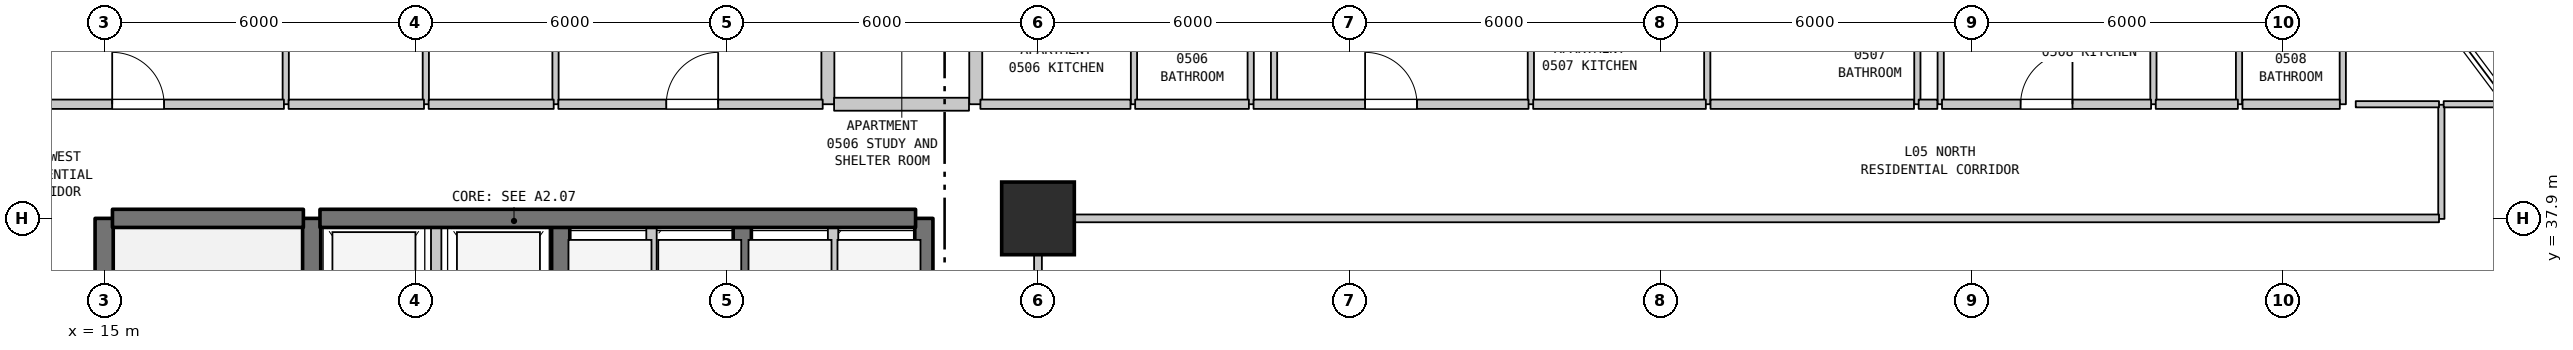
"""IFC4 building model, lengths in metres.
Left out: names, types, materials, properties, quantities, classifications, styles, units other than length and angle.
Written with IfcOpenShell. Run it as: python <this file> out.ifc"""

import sys

from ifc_helpers import new_model, si_unit, direction, frame, frame_2d, origin, origin_2d, place, context, subcontext, project, spatial, rectangle, extrude, element, fill, save


model = new_model("IFC4")
c1 = context("Model", 3, precision=1e-05, world=origin(), true_north=direction((0.0, 1.0)))
c2 = subcontext(c1, "Body", "Model", "MODEL_VIEW")
j1 = project(units=[si_unit("LENGTHUNIT", "METRE"), si_unit("PLANEANGLEUNIT", "RADIAN")], contexts=[c1])
p1 = place(None, origin())
s1 = spatial("IfcSite", under=j1, at=p1, CompositionType="ELEMENT")
p2 = place(p1, origin())
s2 = spatial("IfcBuilding", under=s1, at=p2, CompositionType="ELEMENT")
p3 = place(p2, frame((0.0, 0.0, 27.7)))
s3 = spatial("IfcBuildingStorey", under=s2, at=p3, CompositionType="ELEMENT", Elevation=27.7)
p4 = place(p3, frame((33.0, 37.9, 0.0), z_axis=(0.0, 0.0, 1.0), x_axis=(1.0, 0.0, 0.0)))
e1 = element("IfcColumn", 1, at=p4, inside=s3, PredefinedType="COLUMN", context=c2, shape_type="SweptSolid", body=[
    extrude(rectangle(XDim=1.4, YDim=1.4, at=origin_2d()), origin(), (0.0, 0.0, 1.0), 3.7),
])
p5 = place(p3, frame((15.0, 31.1, 0.0), z_axis=(0.0, 0.0, 1.0), x_axis=(0.0, 1.0, 0.0)))
e2 = element("IfcWall", 2, at=p5, inside=s3, PredefinedType="SHEAR", context=c2, shape_type="SweptSolid", body=[
    extrude(rectangle(XDim=6.8, YDim=0.35, at=frame_2d((3.4, 0.0))), origin(), (0.0, 0.0, 1.0), 3.385),
])
p6 = place(p3, frame((18.5, 40.1, 0.0), z_axis=(0.0, 0.0, 1.0), x_axis=(0.0, 1.0, 0.0)))
e3 = element("IfcWall", 3, at=p6, inside=s3, PredefinedType="PARTITIONING", context=c2, shape_type="SweptSolid", body=[
    extrude(rectangle(XDim=3.2, YDim=0.12, at=frame_2d((1.6, 0.0))), origin(), (0.0, 0.0, 1.0), 3.385),
])
p7 = place(p3, frame((19.0, 35.0, 0.0), z_axis=(0.0, 0.0, 1.0), x_axis=(0.0, 1.0, 0.0)))
e4 = element("IfcWall", 4, at=p7, inside=s3, PredefinedType="SHEAR", context=c2, shape_type="SweptSolid", body=[
    extrude(rectangle(XDim=2.9, YDim=0.35, at=frame_2d((1.45, 0.0))), origin(), (0.0, 0.0, 1.0), 3.385),
])
p8 = place(p3, frame((21.2, 40.1, 0.0), z_axis=(0.0, 0.0, 1.0), x_axis=(0.0, 1.0, 0.0)))
e5 = element("IfcWall", 5, at=p8, inside=s3, PredefinedType="PARTITIONING", context=c2, shape_type="SweptSolid", body=[
    extrude(rectangle(XDim=3.2, YDim=0.12, at=frame_2d((1.6, 0.0))), origin(), (0.0, 0.0, 1.0), 3.385),
])
p9 = place(p8, frame((1.15, 0.0, 0.0)))
e6 = element("IfcOpeningElement", 6, at=p9, cuts=e5, PredefinedType="OPENING", context=c2, shape_type="SweptSolid", body=[
    extrude(rectangle(XDim=0.9, YDim=2.15, at=frame_2d((0.45, 1.075))), frame((0.0, 0.07, 0.0), z_axis=(0.0, -1.0, 0.0), x_axis=(1.0, 0.0, 0.0)), (0.0, 0.0, 1.0), 0.14),
])
p10 = place(p3, frame((21.4, 35.0, 0.0), z_axis=(0.0, 0.0, 1.0), x_axis=(0.0, 1.0, 0.0)))
e7 = element("IfcWall", 7, at=p10, inside=s3, PredefinedType="STANDARD", context=c2, shape_type="SweptSolid", body=[
    extrude(rectangle(XDim=2.9, YDim=0.2, at=frame_2d((1.45, 0.0))), origin(), (0.0, 0.0, 1.0), 3.385),
])
p11 = place(p3, frame((23.7, 40.1, 0.0), z_axis=(0.0, 0.0, 1.0), x_axis=(0.0, 1.0, 0.0)))
e8 = element("IfcWall", 8, at=p11, inside=s3, PredefinedType="PARTITIONING", context=c2, shape_type="SweptSolid", body=[
    extrude(rectangle(XDim=2.05, YDim=0.12, at=frame_2d((1.025, 0.0))), origin(), (0.0, 0.0, 1.0), 3.385),
])
p12 = place(p3, frame((23.8, 35.0, 0.0), z_axis=(0.0, 0.0, 1.0), x_axis=(0.0, 1.0, 0.0)))
e9 = element("IfcWall", 9, at=p12, inside=s3, PredefinedType="SHEAR", context=c2, shape_type="SweptSolid", body=[
    extrude(rectangle(XDim=2.9, YDim=0.35, at=frame_2d((1.45, 0.0))), origin(), (0.0, 0.0, 1.0), 3.385),
])
p13 = place(p3, frame((25.55, 35.0, 0.0), z_axis=(0.0, 0.0, 1.0), x_axis=(0.0, 1.0, 0.0)))
e10 = element("IfcWall", 10, at=p13, inside=s3, PredefinedType="STANDARD", context=c2, shape_type="SweptSolid", body=[
    extrude(rectangle(XDim=2.9, YDim=0.2, at=frame_2d((1.45, 0.0))), origin(), (0.0, 0.0, 1.0), 3.385),
])
p14 = place(p3, frame((27.3, 35.0, 0.0), z_axis=(0.0, 0.0, 1.0), x_axis=(0.0, 1.0, 0.0)))
e11 = element("IfcWall", 11, at=p14, inside=s3, PredefinedType="SHEAR", context=c2, shape_type="SweptSolid", body=[
    extrude(rectangle(XDim=2.9, YDim=0.35, at=frame_2d((1.45, 0.0))), origin(), (0.0, 0.0, 1.0), 3.385),
])
p15 = place(p3, frame((28.95, 40.1, 0.0), z_axis=(0.0, 0.0, 1.0), x_axis=(0.0, 1.0, 0.0)))
e12 = element("IfcWall", 12, at=p15, inside=s3, PredefinedType="STANDARD", context=c2, shape_type="SweptSolid", body=[
    extrude(rectangle(XDim=2.3, YDim=0.25, at=frame_2d((1.15, 0.0))), origin(), (0.0, 0.0, 1.0), 3.385),
])
p16 = place(p3, frame((29.05, 35.0, 0.0), z_axis=(0.0, 0.0, 1.0), x_axis=(0.0, 1.0, 0.0)))
e13 = element("IfcWall", 13, at=p16, inside=s3, PredefinedType="STANDARD", context=c2, shape_type="SweptSolid", body=[
    extrude(rectangle(XDim=2.9, YDim=0.2, at=frame_2d((1.45, 0.0))), origin(), (0.0, 0.0, 1.0), 3.385),
])
p17 = place(p3, frame((30.8, 35.0, 0.0), z_axis=(0.0, 0.0, 1.0), x_axis=(0.0, 1.0, 0.0)))
e14 = element("IfcWall", 14, at=p17, inside=s3, PredefinedType="SHEAR", context=c2, shape_type="SweptSolid", body=[
    extrude(rectangle(XDim=2.9, YDim=0.35, at=frame_2d((1.45, 0.0))), origin(), (0.0, 0.0, 1.0), 3.385),
])
p18 = place(p3, frame((31.8, 40.1, 0.0), z_axis=(0.0, 0.0, 1.0), x_axis=(0.0, 1.0, 0.0)))
e15 = element("IfcWall", 15, at=p18, inside=s3, PredefinedType="STANDARD", context=c2, shape_type="SweptSolid", body=[
    extrude(rectangle(XDim=2.3, YDim=0.25, at=frame_2d((1.15, 0.0))), origin(), (0.0, 0.0, 1.0), 3.385),
])
p19 = place(p3, frame((33.0, 27.91, 0.0), z_axis=(0.0, 0.0, 1.0), x_axis=(0.0, 1.0, 0.0)))
e16 = element("IfcWall", 16, at=p19, inside=s3, PredefinedType="STANDARD", context=c2, shape_type="SweptSolid", body=[
    extrude(rectangle(XDim=9.98, YDim=0.15, at=frame_2d((4.99, 0.0))), origin(), (0.0, 0.0, 1.0), 2.885),
])
for number, where, z_axis, x_axis in (
    (17, (34.85, 40.1, 0.0), (0.0, 0.0, 1.0), (0.0, 1.0, 0.0)),
    (18, (37.1, 40.1, 0.0), (0.0, 0.0, 1.0), (0.0, 1.0, 0.0)),
):
    element("IfcWall", number, at=place(p3, frame(where, z_axis=z_axis, x_axis=x_axis)), inside=s3, PredefinedType="PARTITIONING", context=c2, shape_type="SweptSolid", body=[
        extrude(rectangle(XDim=2.3, YDim=0.12, at=frame_2d((1.15, 0.0))), origin(), (0.0, 0.0, 1.0), 3.385),
    ])
p20 = place(p3, frame((37.55, 40.1, 0.0), z_axis=(0.0, 0.0, 1.0), x_axis=(0.0, 1.0, 0.0)))
e19 = element("IfcWall", 19, at=p20, inside=s3, PredefinedType="PARTITIONING", context=c2, shape_type="SweptSolid", body=[
    extrude(rectangle(XDim=2.05, YDim=0.12, at=frame_2d((1.025, 0.0))), origin(), (0.0, 0.0, 1.0), 3.385),
])
for number, where, z_axis, x_axis in (
    (20, (42.5, 40.1, 0.0), (0.0, 0.0, 1.0), (0.0, 1.0, 0.0)),
    (21, (45.9, 40.1, 0.0), (0.0, 0.0, 1.0), (0.0, 1.0, 0.0)),
    (22, (49.95, 40.1, 0.0), (0.0, 0.0, 1.0), (0.0, 1.0, 0.0)),
):
    element("IfcWall", number, at=place(p3, frame(where, z_axis=z_axis, x_axis=x_axis)), inside=s3, PredefinedType="PARTITIONING", context=c2, shape_type="SweptSolid", body=[
        extrude(rectangle(XDim=2.3, YDim=0.12, at=frame_2d((1.15, 0.0))), origin(), (0.0, 0.0, 1.0), 3.385),
    ])
p21 = place(p3, frame((50.4, 40.1, 0.0), z_axis=(0.0, 0.0, 1.0), x_axis=(0.0, 1.0, 0.0)))
e23 = element("IfcWall", 23, at=p21, inside=s3, PredefinedType="PARTITIONING", context=c2, shape_type="SweptSolid", body=[
    extrude(rectangle(XDim=5.35, YDim=0.12, at=frame_2d((2.675, 0.0))), origin(), (0.0, 0.0, 1.0), 3.385),
])
for number, where, z_axis, x_axis in (
    (24, (54.5, 40.1, 0.0), (0.0, 0.0, 1.0), (0.0, 1.0, 0.0)),
    (25, (56.15, 40.1, 0.0), (0.0, 0.0, 1.0), (0.0, 1.0, 0.0)),
    (26, (58.15, 40.1, 0.0), (0.0, 0.0, 1.0), (0.0, 1.0, 0.0)),
):
    element("IfcWall", number, at=place(p3, frame(where, z_axis=z_axis, x_axis=x_axis)), inside=s3, PredefinedType="PARTITIONING", context=c2, shape_type="SweptSolid", body=[
        extrude(rectangle(XDim=2.3, YDim=0.12, at=frame_2d((1.15, 0.0))), origin(), (0.0, 0.0, 1.0), 3.385),
    ])
p22 = place(p3, frame((60.05, 37.89, 0.0), z_axis=(0.0, 0.0, 1.0), x_axis=(0.0, 1.0, 0.0)))
e27 = element("IfcWall", 27, at=p22, inside=s3, PredefinedType="PARTITIONING", context=c2, shape_type="SweptSolid", body=[
    extrude(rectangle(XDim=2.2, YDim=0.12, at=frame_2d((1.1, 0.0))), origin(), (0.0, 0.0, 1.0), 3.385),
])
p23 = place(p3, frame((15.16, 37.9, 0.0), z_axis=(0.0, 0.0, 1.0), x_axis=(1.0, 0.0, 0.0)))
e28 = element("IfcWall", 28, at=p23, inside=s3, PredefinedType="SHEAR", context=c2, shape_type="SweptSolid", body=[
    extrude(rectangle(XDim=3.68, YDim=0.35, at=frame_2d((1.84, 0.0))), origin(), (0.0, 0.0, 1.0), 3.385),
])
p24 = place(p3, frame((19.16, 37.9, 0.0), z_axis=(0.0, 0.0, 1.0), x_axis=(1.0, 0.0, 0.0)))
e29 = element("IfcWall", 29, at=p24, inside=s3, PredefinedType="SHEAR", context=c2, shape_type="SweptSolid", body=[
    extrude(rectangle(XDim=11.48, YDim=0.35, at=frame_2d((5.74, 0.0))), origin(), (0.0, 0.0, 1.0), 3.385),
])
p25 = place(p3, frame((33.07, 37.9, 0.0), z_axis=(0.0, 0.0, 1.0), x_axis=(1.0, 0.0, 0.0)))
e30 = element("IfcWall", 30, at=p25, inside=s3, PredefinedType="STANDARD", context=c2, shape_type="SweptSolid", body=[
    extrude(rectangle(XDim=26.935, YDim=0.15, at=frame_2d((13.467, 0.0))), origin(), (0.0, 0.0, 1.0), 3.385),
])
p26 = place(p3, frame((12.875, 40.1, 0.0), z_axis=(0.0, 0.0, 1.0), x_axis=(1.0, 0.0, 0.0)))
e31 = element("IfcWall", 31, at=p26, inside=s3, PredefinedType="STANDARD", context=c2, shape_type="SweptSolid", body=[
    extrude(rectangle(XDim=5.59, YDim=0.18, at=frame_2d((2.795, 0.0))), origin(), (0.0, 0.0, 1.0), 3.385),
])
p27 = place(p26, frame((2.28, 0.0, 0.0)))
e32 = element("IfcOpeningElement", 32, at=p27, cuts=e31, PredefinedType="OPENING", context=c2, shape_type="SweptSolid", body=[
    extrude(rectangle(XDim=1.0, YDim=2.15, at=frame_2d((0.5, 1.075))), frame((0.0, 0.1, 0.0), z_axis=(0.0, -1.0, 0.0), x_axis=(1.0, 0.0, 0.0)), (0.0, 0.0, 1.0), 0.2),
])
p28 = place(p3, frame((18.555, 40.1, 0.0), z_axis=(0.0, 0.0, 1.0), x_axis=(1.0, 0.0, 0.0)))
e33 = element("IfcWall", 33, at=p28, inside=s3, PredefinedType="STANDARD", context=c2, shape_type="SweptSolid", body=[
    extrude(rectangle(XDim=2.61, YDim=0.18, at=frame_2d((1.305, 0.0))), origin(), (0.0, 0.0, 1.0), 3.385),
])
p29 = place(p3, frame((21.255, 40.1, 0.0), z_axis=(0.0, 0.0, 1.0), x_axis=(1.0, 0.0, 0.0)))
e34 = element("IfcWall", 34, at=p29, inside=s3, PredefinedType="STANDARD", context=c2, shape_type="SweptSolid", body=[
    extrude(rectangle(XDim=2.41, YDim=0.18, at=frame_2d((1.205, 0.0))), origin(), (0.0, 0.0, 1.0), 3.385),
])
p30 = place(p3, frame((23.755, 40.1, 0.0), z_axis=(0.0, 0.0, 1.0), x_axis=(1.0, 0.0, 0.0)))
e35 = element("IfcWall", 35, at=p30, inside=s3, PredefinedType="STANDARD", context=c2, shape_type="SweptSolid", body=[
    extrude(rectangle(XDim=5.095, YDim=0.18, at=frame_2d((2.548, 0.0))), origin(), (0.0, 0.0, 1.0), 3.385),
])
p31 = place(p30, frame((2.08, 0.0, 0.0)))
e36 = element("IfcOpeningElement", 36, at=p31, cuts=e35, PredefinedType="OPENING", context=c2, shape_type="SweptSolid", body=[
    extrude(rectangle(XDim=1.0, YDim=2.15, at=frame_2d((0.5, 1.075))), frame((0.0, 0.1, 0.0), z_axis=(0.0, -1.0, 0.0), x_axis=(1.0, 0.0, 0.0)), (0.0, 0.0, 1.0), 0.2),
])
p32 = place(p3, frame((29.07, 40.1, 0.0), z_axis=(0.0, 0.0, 1.0), x_axis=(1.0, 0.0, 0.0)))
e37 = element("IfcWall", 37, at=p32, inside=s3, PredefinedType="STANDARD", context=c2, shape_type="SweptSolid", body=[
    extrude(rectangle(XDim=2.6, YDim=0.25, at=frame_2d((1.3, 0.0))), origin(), (0.0, 0.0, 1.0), 3.385),
])
p33 = place(p3, frame((31.89, 40.1, 0.0), z_axis=(0.0, 0.0, 1.0), x_axis=(1.0, 0.0, 0.0)))
e38 = element("IfcWall", 38, at=p33, inside=s3, PredefinedType="STANDARD", context=c2, shape_type="SweptSolid", body=[
    extrude(rectangle(XDim=2.893, YDim=0.18, at=frame_2d((1.447, 0.0))), origin(), (0.0, 0.0, 1.0), 3.385),
])
p34 = place(p3, frame((34.873, 40.1, 0.0), z_axis=(0.0, 0.0, 1.0), x_axis=(1.0, 0.0, 0.0)))
e39 = element("IfcWall", 39, at=p34, inside=s3, PredefinedType="STANDARD", context=c2, shape_type="SweptSolid", body=[
    extrude(rectangle(XDim=2.192, YDim=0.18, at=frame_2d((1.096, 0.0))), origin(), (0.0, 0.0, 1.0), 3.385),
])
p35 = place(p3, frame((37.155, 40.1, 0.0), z_axis=(0.0, 0.0, 1.0), x_axis=(1.0, 0.0, 0.0)))
e40 = element("IfcWall", 40, at=p35, inside=s3, PredefinedType="STANDARD", context=c2, shape_type="SweptSolid", body=[
    extrude(rectangle(XDim=5.3, YDim=0.18, at=frame_2d((2.65, 0.0))), origin(), (0.0, 0.0, 1.0), 3.385),
])
p36 = place(p35, frame((2.15, 0.0, 0.0)))
e41 = element("IfcOpeningElement", 41, at=p36, cuts=e40, PredefinedType="OPENING", context=c2, shape_type="SweptSolid", body=[
    extrude(rectangle(XDim=1.0, YDim=2.15, at=frame_2d((0.5, 1.075))), frame((0.0, 0.1, 0.0), z_axis=(0.0, -1.0, 0.0), x_axis=(1.0, 0.0, 0.0)), (0.0, 0.0, 1.0), 0.2),
])
p37 = place(p3, frame((42.545, 40.1, 0.0), z_axis=(0.0, 0.0, 1.0), x_axis=(1.0, 0.0, 0.0)))
e42 = element("IfcWall", 42, at=p37, inside=s3, PredefinedType="STANDARD", context=c2, shape_type="SweptSolid", body=[
    extrude(rectangle(XDim=3.328, YDim=0.18, at=frame_2d((1.664, 0.0))), origin(), (0.0, 0.0, 1.0), 3.385),
])
p38 = place(p3, frame((45.963, 40.1, 0.0), z_axis=(0.0, 0.0, 1.0), x_axis=(1.0, 0.0, 0.0)))
e43 = element("IfcWall", 43, at=p38, inside=s3, PredefinedType="STANDARD", context=c2, shape_type="SweptSolid", body=[
    extrude(rectangle(XDim=3.922, YDim=0.18, at=frame_2d((1.961, 0.0))), origin(), (0.0, 0.0, 1.0), 3.385),
])
p39 = place(p3, frame((49.975, 40.1, 0.0), z_axis=(0.0, 0.0, 1.0), x_axis=(1.0, 0.0, 0.0)))
e44 = element("IfcWall", 44, at=p39, inside=s3, PredefinedType="STANDARD", context=c2, shape_type="SweptSolid", body=[
    extrude(rectangle(XDim=0.36, YDim=0.18, at=frame_2d((0.18, 0.0))), origin(), (0.0, 0.0, 1.0), 3.385),
])
p40 = place(p3, frame((50.425, 40.1, 0.0), z_axis=(0.0, 0.0, 1.0), x_axis=(1.0, 0.0, 0.0)))
e45 = element("IfcWall", 45, at=p40, inside=s3, PredefinedType="STANDARD", context=c2, shape_type="SweptSolid", body=[
    extrude(rectangle(XDim=4.03, YDim=0.18, at=frame_2d((2.015, 0.0))), origin(), (0.0, 0.0, 1.0), 3.385),
])
p41 = place(p40, frame((1.515, 0.0, 0.0)))
e46 = element("IfcOpeningElement", 46, at=p41, cuts=e45, PredefinedType="OPENING", context=c2, shape_type="SweptSolid", body=[
    extrude(rectangle(XDim=1.0, YDim=2.15, at=frame_2d((0.5, 1.075))), frame((0.0, 0.1, 0.0), z_axis=(0.0, -1.0, 0.0), x_axis=(1.0, 0.0, 0.0)), (0.0, 0.0, 1.0), 0.2),
])
p42 = place(p3, frame((54.545, 40.1, 0.0), z_axis=(0.0, 0.0, 1.0), x_axis=(1.0, 0.0, 0.0)))
e47 = element("IfcWall", 47, at=p42, inside=s3, PredefinedType="STANDARD", context=c2, shape_type="SweptSolid", body=[
    extrude(rectangle(XDim=1.583, YDim=0.18, at=frame_2d((0.792, 0.0))), origin(), (0.0, 0.0, 1.0), 3.385),
])
p43 = place(p3, frame((56.218, 40.1, 0.0), z_axis=(0.0, 0.0, 1.0), x_axis=(1.0, 0.0, 0.0)))
e48 = element("IfcWall", 48, at=p43, inside=s3, PredefinedType="STANDARD", context=c2, shape_type="SweptSolid", body=[
    extrude(rectangle(XDim=1.875, YDim=0.18, at=frame_2d((0.938, 0.0))), origin(), (0.0, 0.0, 1.0), 3.385),
])
p44 = place(p3, frame((58.4, 40.1, 0.0), z_axis=(0.0, 0.0, 1.0), x_axis=(1.0, 0.0, 0.0)))
e49 = element("IfcWall", 49, at=p44, inside=s3, PredefinedType="PARTITIONING", context=c2, shape_type="SweptSolid", body=[
    extrude(rectangle(XDim=1.605, YDim=0.12, at=frame_2d((0.802, 0.0))), origin(), (0.0, 0.0, 1.0), 3.385),
])
p45 = place(p3, frame((60.095, 40.1, 0.0), z_axis=(0.0, 0.0, 1.0), x_axis=(1.0, 0.0, 0.0)))
e50 = element("IfcWall", 50, at=p45, inside=s3, PredefinedType="PARTITIONING", context=c2, shape_type="SweptSolid", body=[
    extrude(rectangle(XDim=1.245, YDim=0.12, at=frame_2d((0.623, 0.0))), origin(), (0.0, 0.0, 1.0), 3.385),
])
p46 = place(p27, origin())
e51 = element("IfcDoor", 51, at=p46, inside=s3, OperationType="SINGLE_SWING_LEFT", PredefinedType="DOOR", context=c2, shape_type="SweptSolid", body=[
    extrude(rectangle(XDim=1.0, YDim=2.15, at=frame_2d((0.5, 1.075))), frame((0.0, 0.025, 0.0), z_axis=(0.0, -1.0, 0.0), x_axis=(1.0, 0.0, 0.0)), (0.0, 0.0, 1.0), 0.05),
])
fill(e32, e51)
p47 = place(p31, origin())
e52 = element("IfcDoor", 52, at=p47, inside=s3, OperationType="SINGLE_SWING_RIGHT", PredefinedType="DOOR", context=c2, shape_type="SweptSolid", body=[
    extrude(rectangle(XDim=1.0, YDim=2.15, at=frame_2d((0.5, 1.075))), frame((0.0, 0.025, 0.0), z_axis=(0.0, -1.0, 0.0), x_axis=(1.0, 0.0, 0.0)), (0.0, 0.0, 1.0), 0.05),
])
fill(e36, e52)
p48 = place(p36, origin())
e53 = element("IfcDoor", 53, at=p48, inside=s3, OperationType="SINGLE_SWING_LEFT", PredefinedType="DOOR", context=c2, shape_type="SweptSolid", body=[
    extrude(rectangle(XDim=1.0, YDim=2.15, at=frame_2d((0.5, 1.075))), frame((0.0, 0.025, 0.0), z_axis=(0.0, -1.0, 0.0), x_axis=(1.0, 0.0, 0.0)), (0.0, 0.0, 1.0), 0.05),
])
fill(e41, e53)
p49 = place(p41, origin())
e54 = element("IfcDoor", 54, at=p49, inside=s3, OperationType="SINGLE_SWING_RIGHT", PredefinedType="DOOR", context=c2, shape_type="SweptSolid", body=[
    extrude(rectangle(XDim=1.0, YDim=2.15, at=frame_2d((0.5, 1.075))), frame((0.0, 0.025, 0.0), z_axis=(0.0, -1.0, 0.0), x_axis=(1.0, 0.0, 0.0)), (0.0, 0.0, 1.0), 0.05),
])
fill(e46, e54)
save(model, sys.argv[1])
